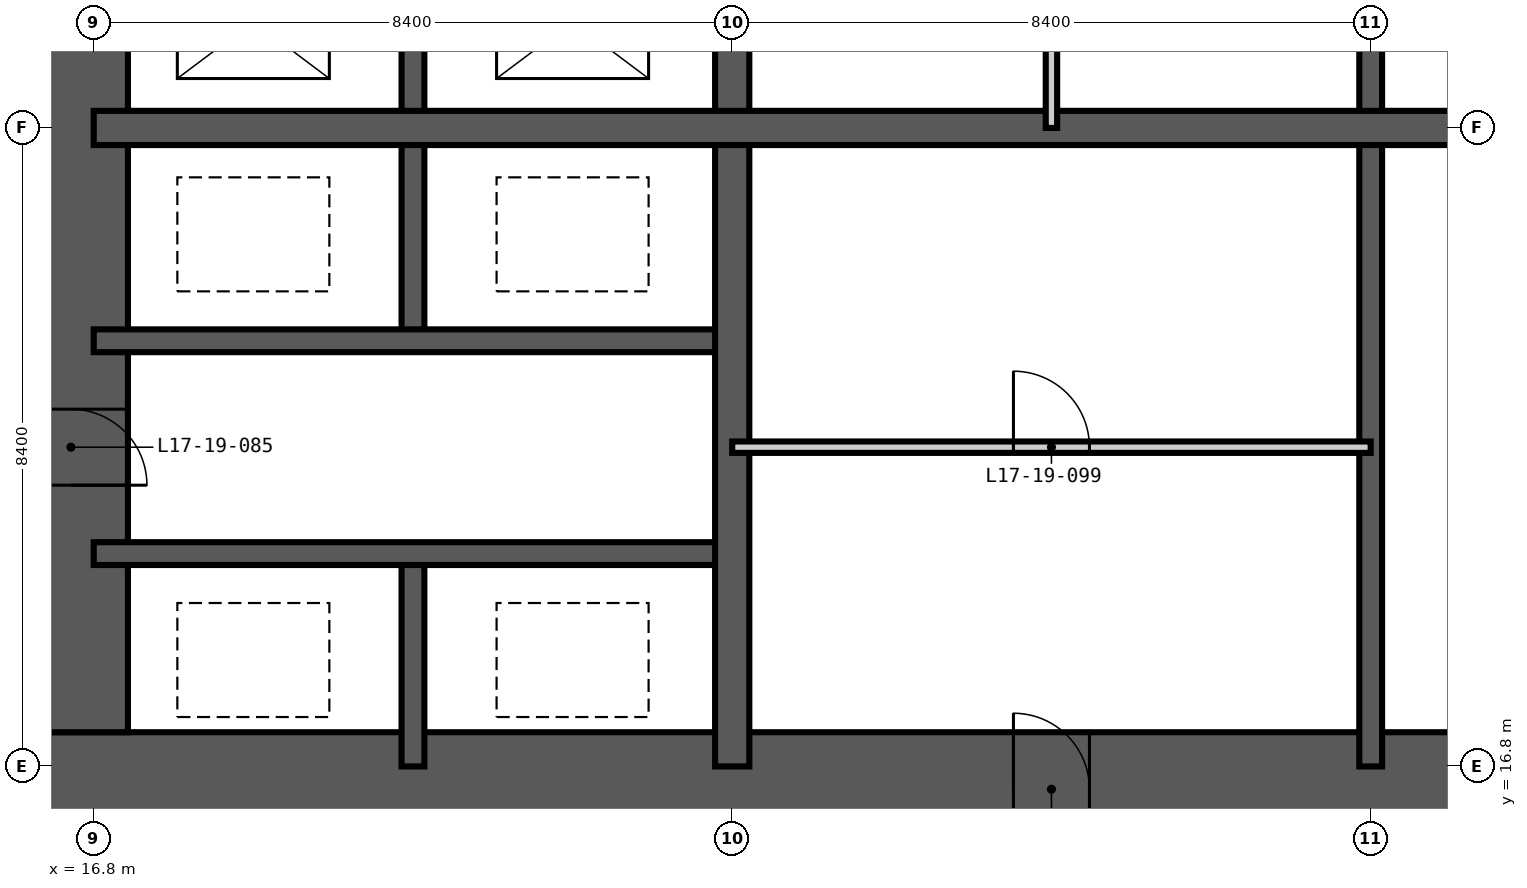
"""IFC4 building model, lengths in metres.
Left out: names, types, materials, properties, quantities, classifications, styles, units other than length and angle.
Written with IfcOpenShell. Run it as: python <this file> out.ifc"""

import sys

from ifc_helpers import new_model, si_unit, direction, frame, frame_2d, origin, place, context, subcontext, project, spatial, rectangle, extrude, element, fill, save


model = new_model("IFC4")
c1 = context("Model", 3, precision=1e-05, world=origin(), true_north=direction((0.0, 1.0)))
c2 = subcontext(c1, "Body", "Model", "MODEL_VIEW")
j1 = project(units=[si_unit("LENGTHUNIT", "METRE"), si_unit("PLANEANGLEUNIT", "RADIAN")], contexts=[c1])
p1 = place(None, origin())
s1 = spatial("IfcSite", under=j1, at=p1, CompositionType="ELEMENT")
p2 = place(p1, origin())
s2 = spatial("IfcBuilding", under=s1, at=p2, CompositionType="ELEMENT")
p3 = place(p2, frame((0.0, 0.0, 70.2)))
s3 = spatial("IfcBuildingStorey", under=s2, at=p3, CompositionType="ELEMENT", Elevation=70.2)
p4 = place(p3, frame((15.75, 16.5, -0.35), z_axis=(0.0, 0.0, 1.0), x_axis=(1.0, 0.0, 0.0)))
e1 = element("IfcWall", 1, at=p4, inside=s3, PredefinedType="SHEAR", context=c2, shape_type="SweptSolid", body=[
    extrude(rectangle(XDim=27.3, YDim=1.5, at=frame_2d((13.65, 0.0))), origin(), (0.0, 0.0, 1.0), 3.6),
])
p5 = place(p4, frame((13.15, 0.0, 0.35)))
e2 = element("IfcOpeningElement", 2, at=p5, cuts=e1, PredefinedType="OPENING", context=c2, shape_type="SweptSolid", body=[
    extrude(rectangle(XDim=1.0, YDim=2.1, at=frame_2d((0.5, 1.05))), frame((0.0, 0.76, 0.0), z_axis=(0.0, -1.0, 0.0), x_axis=(1.0, 0.0, 0.0)), (0.0, 0.0, 1.0), 1.52),
])
p6 = place(p4, frame((19.45, 0.0, 0.35)))
e3 = element("IfcOpeningElement", 3, at=p6, cuts=e1, PredefinedType="OPENING", context=c2, shape_type="SweptSolid", body=[
    extrude(rectangle(XDim=1.0, YDim=2.1, at=frame_2d((0.5, 1.05))), frame((0.0, 0.76, 0.0), z_axis=(0.0, -1.0, 0.0), x_axis=(1.0, 0.0, 0.0)), (0.0, 0.0, 1.0), 1.52),
])
p7 = place(p3, frame((16.5, 41.55, -0.35), z_axis=(0.0, 0.0, 1.0), x_axis=(0.0, -1.0, 0.0)))
e4 = element("IfcWall", 4, at=p7, inside=s3, PredefinedType="SHEAR", context=c2, shape_type="SweptSolid", body=[
    extrude(rectangle(XDim=24.3, YDim=1.5, at=frame_2d((12.15, 0.0))), origin(), (0.0, 0.0, 1.0), 3.6),
])
p8 = place(p7, frame((11.25, 0.0, 0.35)))
e5 = element("IfcOpeningElement", 5, at=p8, cuts=e4, PredefinedType="OPENING", context=c2, shape_type="SweptSolid", body=[
    extrude(rectangle(XDim=1.8, YDim=2.2, at=frame_2d((0.9, 1.1))), frame((0.0, 0.76, 0.0), z_axis=(0.0, -1.0, 0.0), x_axis=(1.0, 0.0, 0.0)), (0.0, 0.0, 1.0), 1.52),
])
p9 = place(p7, frame((20.05, 0.0, 0.35)))
e6 = element("IfcOpeningElement", 6, at=p9, cuts=e4, PredefinedType="OPENING", context=c2, shape_type="SweptSolid", body=[
    extrude(rectangle(XDim=1.0, YDim=2.1, at=frame_2d((0.5, 1.05))), frame((0.0, 0.76, 0.0), z_axis=(0.0, -1.0, 0.0), x_axis=(1.0, 0.0, 0.0)), (0.0, 0.0, 1.0), 1.52),
])
p10 = place(p7, frame((5.35, 0.0, 0.35)))
e7 = element("IfcOpeningElement", 7, at=p10, cuts=e4, PredefinedType="OPENING", context=c2, shape_type="SweptSolid", body=[
    extrude(rectangle(XDim=1.0, YDim=2.1, at=frame_2d((0.5, 1.05))), frame((0.0, 0.76, 0.0), z_axis=(0.0, -1.0, 0.0), x_axis=(1.0, 0.0, 0.0)), (0.0, 0.0, 1.0), 1.52),
])
p11 = place(p3, frame((21.0, 16.8, -0.35), z_axis=(0.0, 0.0, 1.0), x_axis=(0.0, 1.0, 0.0)))
e8 = element("IfcWall", 8, at=p11, inside=s3, PredefinedType="SHEAR", context=c2, shape_type="SweptSolid", body=[
    extrude(rectangle(XDim=2.8, YDim=0.3, at=frame_2d((1.4, 0.0))), origin(), (0.0, 0.0, 1.0), 3.6),
])
p12 = place(p3, frame((21.0, 22.4, -0.35), z_axis=(0.0, 0.0, 1.0), x_axis=(0.0, 1.0, 0.0)))
e9 = element("IfcWall", 9, at=p12, inside=s3, PredefinedType="SHEAR", context=c2, shape_type="SweptSolid", body=[
    extrude(rectangle(XDim=5.6, YDim=0.3, at=frame_2d((2.8, 0.0))), origin(), (0.0, 0.0, 1.0), 3.6),
])
p13 = place(p3, frame((33.6, 16.8, -0.35), z_axis=(0.0, 0.0, 1.0), x_axis=(0.0, 1.0, 0.0)))
e10 = element("IfcWall", 10, at=p13, inside=s3, PredefinedType="SHEAR", context=c2, shape_type="SweptSolid", body=[
    extrude(rectangle(XDim=25.2, YDim=0.3, at=frame_2d((12.6, 0.0))), origin(), (0.0, 0.0, 1.0), 3.6),
])
p14 = place(p13, frame((22.5, 0.0, 0.35)))
e11 = element("IfcOpeningElement", 11, at=p14, cuts=e10, PredefinedType="OPENING", context=c2, shape_type="SweptSolid", body=[
    extrude(rectangle(XDim=1.2, YDim=2.2, at=frame_2d((0.6, 1.1))), frame((0.0, 0.16, 0.0), z_axis=(0.0, -1.0, 0.0), x_axis=(1.0, 0.0, 0.0)), (0.0, 0.0, 1.0), 0.32),
])
p15 = place(p13, frame((18.3, 0.0, 0.35)))
e12 = element("IfcOpeningElement", 12, at=p15, cuts=e10, PredefinedType="OPENING", context=c2, shape_type="SweptSolid", body=[
    extrude(rectangle(XDim=1.2, YDim=2.2, at=frame_2d((0.6, 1.1))), frame((0.0, 0.16, 0.0), z_axis=(0.0, -1.0, 0.0), x_axis=(1.0, 0.0, 0.0)), (0.0, 0.0, 1.0), 0.32),
])
p16 = place(p13, frame((12.1, 0.0, 0.35)))
e13 = element("IfcOpeningElement", 13, at=p16, cuts=e10, PredefinedType="OPENING", context=c2, shape_type="SweptSolid", body=[
    extrude(rectangle(XDim=1.0, YDim=2.1, at=frame_2d((0.5, 1.05))), frame((0.0, 0.16, 0.0), z_axis=(0.0, -1.0, 0.0), x_axis=(1.0, 0.0, 0.0)), (0.0, 0.0, 1.0), 0.32),
])
for number, where, z_axis, x_axis in (
    (14, (16.8, 19.6, -0.35), (0.0, 0.0, 1.0), (1.0, 0.0, 0.0)),
    (15, (16.8, 22.4, -0.35), (0.0, 0.0, 1.0), (1.0, 0.0, 0.0)),
):
    element("IfcWall", number, at=place(p3, frame(where, z_axis=z_axis, x_axis=x_axis)), inside=s3, PredefinedType="SHEAR", context=c2, shape_type="SweptSolid", body=[
        extrude(rectangle(XDim=8.4, YDim=0.3, at=frame_2d((4.2, 0.0))), origin(), (0.0, 0.0, 1.0), 3.6),
    ])
for number, where, z_axis, x_axis in (
    (16, (25.2, 16.8, -0.35), (0.0, 0.0, 1.0), (0.0, 1.0, 0.0)),
    (17, (16.8, 25.2, -0.35), (0.0, 0.0, 1.0), (1.0, 0.0, 0.0)),
):
    element("IfcWall", number, at=place(p3, frame(where, z_axis=z_axis, x_axis=x_axis)), inside=s3, PredefinedType="SHEAR", context=c2, shape_type="SweptSolid", body=[
        extrude(rectangle(XDim=25.2, YDim=0.45, at=frame_2d((12.6, 0.0))), origin(), (0.0, 0.0, 1.0), 3.6),
    ])
p17 = place(p3, frame((29.4, 25.2, 0.0), z_axis=(0.0, 0.0, 1.0), x_axis=(0.0, 1.0, 0.0)))
e18 = element("IfcWall", 18, at=p17, inside=s3, PredefinedType="PARTITIONING", context=c2, shape_type="SweptSolid", body=[
    extrude(rectangle(XDim=2.8, YDim=0.15, at=frame_2d((1.4, 0.0))), origin(), (0.0, 0.0, 1.0), 3.25),
])
p18 = place(p3, frame((25.2, 21.0, 0.0), z_axis=(0.0, 0.0, 1.0), x_axis=(1.0, 0.0, 0.0)))
e19 = element("IfcWall", 19, at=p18, inside=s3, PredefinedType="PARTITIONING", context=c2, shape_type="SweptSolid", body=[
    extrude(rectangle(XDim=8.4, YDim=0.15, at=frame_2d((4.2, 0.0))), origin(), (0.0, 0.0, 1.0), 3.25),
])
p19 = place(p18, frame((3.7, 0.0, 0.0)))
e20 = element("IfcOpeningElement", 20, at=p19, cuts=e19, PredefinedType="OPENING", context=c2, shape_type="SweptSolid", body=[
    extrude(rectangle(XDim=1.0, YDim=2.1, at=frame_2d((0.5, 1.05))), frame((0.0, 0.085, 0.0), z_axis=(0.0, -1.0, 0.0), x_axis=(1.0, 0.0, 0.0)), (0.0, 0.0, 1.0), 0.17),
])
p20 = place(p9, origin())
e21 = element("IfcDoor", 21, at=p20, inside=s3, OperationType="SINGLE_SWING_RIGHT", PredefinedType="DOOR", context=c2, shape_type="SweptSolid", body=[
    extrude(rectangle(XDim=1.0, YDim=2.1, at=frame_2d((0.5, 1.05))), frame((0.0, 0.025, 0.0), z_axis=(0.0, -1.0, 0.0), x_axis=(1.0, 0.0, 0.0)), (0.0, 0.0, 1.0), 0.05),
])
fill(e6, e21)
p21 = place(p5, origin())
e22 = element("IfcDoor", 22, at=p21, inside=s3, OperationType="SINGLE_SWING_LEFT", PredefinedType="DOOR", context=c2, shape_type="SweptSolid", body=[
    extrude(rectangle(XDim=1.0, YDim=2.1, at=frame_2d((0.5, 1.05))), frame((0.0, 0.025, 0.0), z_axis=(0.0, -1.0, 0.0), x_axis=(1.0, 0.0, 0.0)), (0.0, 0.0, 1.0), 0.05),
])
fill(e2, e22)
p22 = place(p19, origin())
e23 = element("IfcDoor", 23, at=p22, inside=s3, OperationType="SINGLE_SWING_LEFT", PredefinedType="DOOR", context=c2, shape_type="SweptSolid", body=[
    extrude(rectangle(XDim=1.0, YDim=2.1, at=frame_2d((0.5, 1.05))), frame((0.0, 0.025, 0.0), z_axis=(0.0, -1.0, 0.0), x_axis=(1.0, 0.0, 0.0)), (0.0, 0.0, 1.0), 0.05),
])
fill(e20, e23)
save(model, sys.argv[1])
